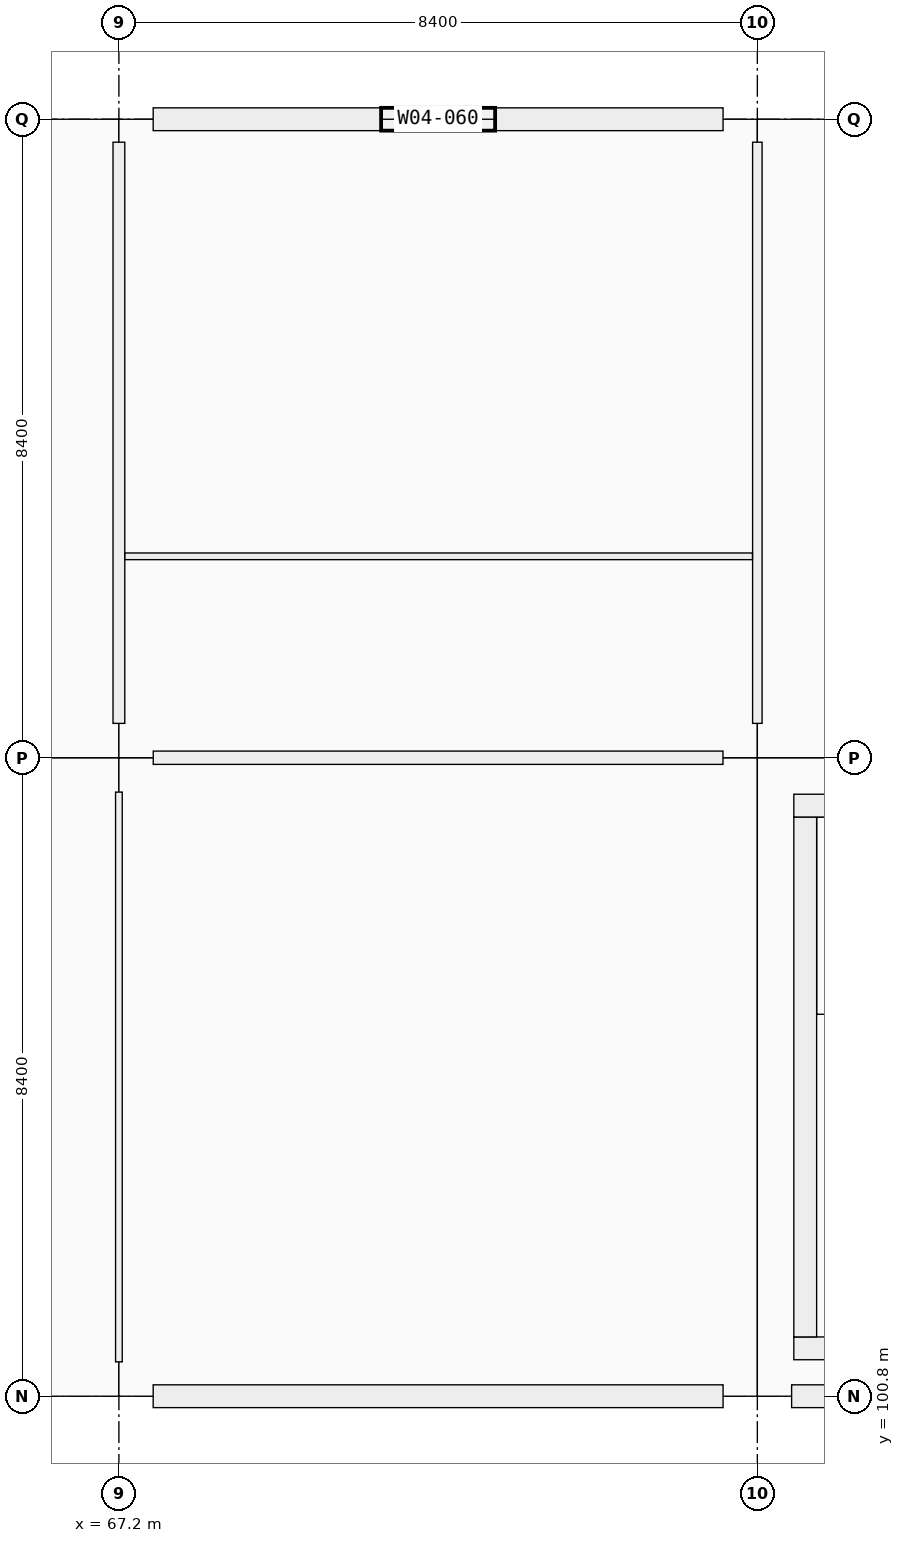
"""IFC4 building model, lengths in metres.
Left out: names, types, materials, properties, quantities, classifications, styles, units other than length and angle.
Written with IfcOpenShell. Run it as: python <this file> out.ifc"""

import sys

from ifc_helpers import new_model, si_unit, direction, frame, frame_2d, origin, origin_2d, place, context, subcontext, project, spatial, rectangle, extrude, element, fill, save


model = new_model("IFC4")
c1 = context("Model", 3, precision=1e-05, world=origin(), true_north=direction((0.0, 1.0)))
c2 = subcontext(c1, "Body", "Model", "MODEL_VIEW")
j1 = project(units=[si_unit("LENGTHUNIT", "METRE"), si_unit("PLANEANGLEUNIT", "RADIAN")], contexts=[c1])
p1 = place(None, origin())
s1 = spatial("IfcSite", under=j1, at=p1, CompositionType="ELEMENT")
p2 = place(p1, origin())
s2 = spatial("IfcBuilding", under=s1, at=p2, CompositionType="ELEMENT")
p3 = place(p2, frame((0.0, 0.0, 5.76)))
s3 = spatial("IfcBuildingStorey", under=s2, at=p3, CompositionType="ELEMENT", Elevation=5.76)
for number, where, z_axis, x_axis in (
    (1, (67.2, 100.8, 0.0), (0.0, 0.0, 1.0), (1.0, 0.0, 0.0)),
    (2, (67.2, 109.2, 0.0), (0.0, 0.0, 1.0), (1.0, 0.0, 0.0)),
):
    element("IfcColumn", number, at=place(p3, frame(where, z_axis=z_axis, x_axis=x_axis)), inside=s3, PredefinedType="COLUMN", context=c2, shape_type="SweptSolid", body=[
        extrude(rectangle(XDim=0.9, YDim=0.9, at=origin_2d()), origin(), (0.0, 0.0, 1.0), 4.5),
    ])
p4 = place(p3, frame((67.2, 117.6, 0.0), z_axis=(0.0, 0.0, 1.0), x_axis=(1.0, 0.0, 0.0)))
e3 = element("IfcColumn", 3, at=p4, inside=s3, PredefinedType="COLUMN", context=c2, shape_type="SweptSolid", body=[
    extrude(rectangle(XDim=0.9, YDim=0.6, at=origin_2d()), origin(), (0.0, 0.0, 1.0), 4.5),
])
for number, where, z_axis, x_axis in (
    (4, (75.6, 100.8, 0.0), (0.0, 0.0, 1.0), (1.0, 0.0, 0.0)),
    (5, (75.6, 109.2, 0.0), (0.0, 0.0, 1.0), (1.0, 0.0, 0.0)),
):
    element("IfcColumn", number, at=place(p3, frame(where, z_axis=z_axis, x_axis=x_axis)), inside=s3, PredefinedType="COLUMN", context=c2, shape_type="SweptSolid", body=[
        extrude(rectangle(XDim=0.9, YDim=0.9, at=origin_2d()), origin(), (0.0, 0.0, 1.0), 4.5),
    ])
p5 = place(p3, frame((75.6, 117.6, 0.0), z_axis=(0.0, 0.0, 1.0), x_axis=(1.0, 0.0, 0.0)))
e6 = element("IfcColumn", 6, at=p5, inside=s3, PredefinedType="COLUMN", context=c2, shape_type="SweptSolid", body=[
    extrude(rectangle(XDim=0.9, YDim=0.6, at=origin_2d()), origin(), (0.0, 0.0, 1.0), 4.5),
])
p6 = place(p3, frame((75.149, 100.8, 0.0), z_axis=(0.0, 0.0, 1.0), x_axis=(-1.0, 0.0, 0.0)))
e7 = element("IfcWall", 7, at=p6, inside=s3, PredefinedType="SOLIDWALL", context=c2, shape_type="SweptSolid", body=[
    extrude(rectangle(XDim=7.498, YDim=0.3, at=frame_2d((3.749, 0.0))), origin(), (0.0, 0.0, 1.0), 3.4),
])
p7 = place(p6, frame((2.549, 0.0, 0.9)))
e8 = element("IfcOpeningElement", 8, at=p7, cuts=e7, PredefinedType="OPENING", context=c2, shape_type="SweptSolid", body=[
    extrude(rectangle(XDim=2.4, YDim=1.8, at=frame_2d((1.2, 0.9))), frame((0.0, 0.15, 0.0), z_axis=(0.0, -1.0, 0.0), x_axis=(1.0, 0.0, 0.0)), (0.0, 0.0, 1.0), 0.3),
])
p8 = place(p3, frame((67.651, 117.6, 0.0), z_axis=(0.0, 0.0, 1.0), x_axis=(1.0, 0.0, 0.0)))
e9 = element("IfcWall", 9, at=p8, inside=s3, PredefinedType="SOLIDWALL", context=c2, shape_type="SweptSolid", body=[
    extrude(rectangle(XDim=7.498, YDim=0.3, at=frame_2d((3.749, 0.0))), origin(), (0.0, 0.0, 1.0), 3.4),
])
p9 = place(p8, frame((2.999, 0.0, 0.9)))
e10 = element("IfcOpeningElement", 10, at=p9, cuts=e9, PredefinedType="OPENING", context=c2, shape_type="SweptSolid", body=[
    extrude(rectangle(XDim=1.5, YDim=1.8, at=frame_2d((0.75, 0.9))), frame((0.0, 0.15, 0.0), z_axis=(0.0, -1.0, 0.0), x_axis=(1.0, 0.0, 0.0)), (0.0, 0.0, 1.0), 0.3),
])
p10 = place(p3, frame((83.549, 100.8, 0.0), z_axis=(0.0, 0.0, 1.0), x_axis=(-1.0, 0.0, 0.0)))
e11 = element("IfcWall", 11, at=p10, inside=s3, PredefinedType="SOLIDWALL", context=c2, shape_type="SweptSolid", body=[
    extrude(rectangle(XDim=7.498, YDim=0.3, at=frame_2d((3.749, 0.0))), origin(), (0.0, 0.0, 1.0), 3.4),
])
p11 = place(p3, frame((83.52, 101.43, 0.0), z_axis=(0.0, 0.0, 1.0), x_axis=(-1.0, 0.0, 0.0)))
e12 = element("IfcWall", 12, at=p11, inside=s3, PredefinedType="SHEAR", context=c2, shape_type="SweptSolid", body=[
    extrude(rectangle(XDim=7.44, YDim=0.3, at=frame_2d((3.72, 0.0))), origin(), (0.0, 0.0, 1.0), 4.5),
])
p12 = place(p3, frame((76.23, 101.58, 0.0), z_axis=(0.0, 0.0, 1.0), x_axis=(0.0, 1.0, 0.0)))
e13 = element("IfcWall", 13, at=p12, inside=s3, PredefinedType="SHEAR", context=c2, shape_type="SweptSolid", body=[
    extrude(rectangle(XDim=6.84, YDim=0.3, at=frame_2d((3.42, 0.0))), origin(), (0.0, 0.0, 1.0), 4.5),
])
p13 = place(p3, frame((76.08, 108.57, 0.0), z_axis=(0.0, 0.0, 1.0), x_axis=(1.0, 0.0, 0.0)))
e14 = element("IfcWall", 14, at=p13, inside=s3, PredefinedType="SHEAR", context=c2, shape_type="SweptSolid", body=[
    extrude(rectangle(XDim=7.44, YDim=0.3, at=frame_2d((3.72, 0.0))), origin(), (0.0, 0.0, 1.0), 4.5),
])
p14 = place(p3, frame((67.652, 109.2, 0.0), z_axis=(0.0, 0.0, 1.0), x_axis=(1.0, 0.0, 0.0)))
e15 = element("IfcWall", 15, at=p14, inside=s3, PredefinedType="PARTITIONING", context=c2, shape_type="SweptSolid", body=[
    extrude(rectangle(XDim=7.496, YDim=0.175, at=frame_2d((3.748, 0.0))), origin(), (0.0, 0.0, 1.0), 2.4),
])
p15 = place(p3, frame((67.2, 101.252, 0.0), z_axis=(0.0, 0.0, 1.0), x_axis=(0.0, 1.0, 0.0)))
e16 = element("IfcWall", 16, at=p15, inside=s3, PredefinedType="PARTITIONING", context=c2, shape_type="SweptSolid", body=[
    extrude(rectangle(XDim=7.496, YDim=0.088, at=frame_2d((3.748, 0.0))), origin(), (0.0, 0.0, 1.0), 2.4),
])
p16 = place(p15, frame((3.268, 0.0, 0.0)))
e17 = element("IfcOpeningElement", 17, at=p16, cuts=e16, PredefinedType="OPENING", context=c2, shape_type="SweptSolid", body=[
    extrude(rectangle(XDim=0.96, YDim=2.18, at=frame_2d((0.48, 1.09))), frame((0.0, 0.044, 0.0), z_axis=(0.0, -1.0, 0.0), x_axis=(1.0, 0.0, 0.0)), (0.0, 0.0, 1.0), 0.088),
])
p17 = place(p3, frame((67.2, 109.652, 0.0), z_axis=(0.0, 0.0, 1.0), x_axis=(0.0, 1.0, 0.0)))
e18 = element("IfcWall", 18, at=p17, inside=s3, PredefinedType="PARTITIONING", context=c2, shape_type="SweptSolid", body=[
    extrude(rectangle(XDim=7.646, YDim=0.155, at=frame_2d((3.823, 0.0))), origin(), (0.0, 0.0, 1.0), 2.4),
])
p18 = place(p17, frame((0.533, 0.0, 0.0)))
e19 = element("IfcOpeningElement", 19, at=p18, cuts=e18, PredefinedType="OPENING", context=c2, shape_type="SweptSolid", body=[
    extrude(rectangle(XDim=0.96, YDim=2.1, at=frame_2d((0.48, 1.05))), frame((0.0, 0.078, 0.0), z_axis=(0.0, -1.0, 0.0), x_axis=(1.0, 0.0, 0.0)), (0.0, 0.0, 1.0), 0.155),
])
p19 = place(p17, frame((4.473, 0.0, 0.0)))
e20 = element("IfcOpeningElement", 20, at=p19, cuts=e18, PredefinedType="OPENING", context=c2, shape_type="SweptSolid", body=[
    extrude(rectangle(XDim=0.92, YDim=2.1, at=frame_2d((0.46, 1.05))), frame((0.0, 0.078, 0.0), z_axis=(0.0, -1.0, 0.0), x_axis=(1.0, 0.0, 0.0)), (0.0, 0.0, 1.0), 0.155),
])
p20 = place(p3, frame((75.6, 109.652, 0.0), z_axis=(0.0, 0.0, 1.0), x_axis=(0.0, 1.0, 0.0)))
e21 = element("IfcWall", 21, at=p20, inside=s3, PredefinedType="PARTITIONING", context=c2, shape_type="SweptSolid", body=[
    extrude(rectangle(XDim=7.646, YDim=0.125, at=frame_2d((3.823, 0.0))), origin(), (0.0, 0.0, 1.0), 2.4),
])
p21 = place(p3, frame((67.28, 111.85, 0.0), z_axis=(0.0, 0.0, 1.0), x_axis=(1.0, 0.0, 0.0)))
e22 = element("IfcWall", 22, at=p21, inside=s3, PredefinedType="PARTITIONING", context=c2, shape_type="SweptSolid", body=[
    extrude(rectangle(XDim=8.256, YDim=0.088, at=frame_2d((4.128, 0.0))), origin(), (0.0, 0.0, 1.0), 2.4),
])
p22 = place(p7, origin())
e23 = element("IfcWindow", 23, at=p22, inside=s3, PartitioningType="SINGLE_PANEL", PredefinedType="WINDOW", context=c2, shape_type="SweptSolid", body=[
    extrude(rectangle(XDim=2.4, YDim=1.8, at=frame_2d((1.2, 0.9))), frame((0.0, 0.03, 0.0), z_axis=(0.0, -1.0, 0.0), x_axis=(1.0, 0.0, 0.0)), (0.0, 0.0, 1.0), 0.06),
])
fill(e8, e23)
p23 = place(p9, origin())
e24 = element("IfcWindow", 24, at=p23, inside=s3, PartitioningType="SINGLE_PANEL", PredefinedType="WINDOW", context=c2, shape_type="SweptSolid", body=[
    extrude(rectangle(XDim=1.5, YDim=1.8, at=frame_2d((0.75, 0.9))), frame((0.0, 0.03, 0.0), z_axis=(0.0, -1.0, 0.0), x_axis=(1.0, 0.0, 0.0)), (0.0, 0.0, 1.0), 0.06),
])
fill(e10, e24)
p24 = place(p18, origin())
e25 = element("IfcDoor", 25, at=p24, inside=s3, OperationType="SINGLE_SWING_RIGHT", PredefinedType="DOOR", context=c2, shape_type="SweptSolid", body=[
    extrude(rectangle(XDim=0.96, YDim=2.1, at=frame_2d((0.48, 1.05))), frame((0.0, 0.025, 0.0), z_axis=(0.0, -1.0, 0.0), x_axis=(1.0, 0.0, 0.0)), (0.0, 0.0, 1.0), 0.05),
])
fill(e19, e25)
p25 = place(p19, origin())
e26 = element("IfcDoor", 26, at=p25, inside=s3, OperationType="SINGLE_SWING_LEFT", PredefinedType="DOOR", context=c2, shape_type="SweptSolid", body=[
    extrude(rectangle(XDim=0.92, YDim=2.1, at=frame_2d((0.46, 1.05))), frame((0.0, 0.025, 0.0), z_axis=(0.0, -1.0, 0.0), x_axis=(1.0, 0.0, 0.0)), (0.0, 0.0, 1.0), 0.05),
])
fill(e20, e26)
p26 = place(p16, origin())
e27 = element("IfcDoor", 27, at=p26, inside=s3, OperationType="SINGLE_SWING_LEFT", PredefinedType="DOOR", context=c2, shape_type="SweptSolid", body=[
    extrude(rectangle(XDim=0.96, YDim=2.18, at=frame_2d((0.48, 1.09))), frame((0.0, 0.025, 0.0), z_axis=(0.0, -1.0, 0.0), x_axis=(1.0, 0.0, 0.0)), (0.0, 0.0, 1.0), 0.05),
])
fill(e17, e27)
save(model, sys.argv[1])
